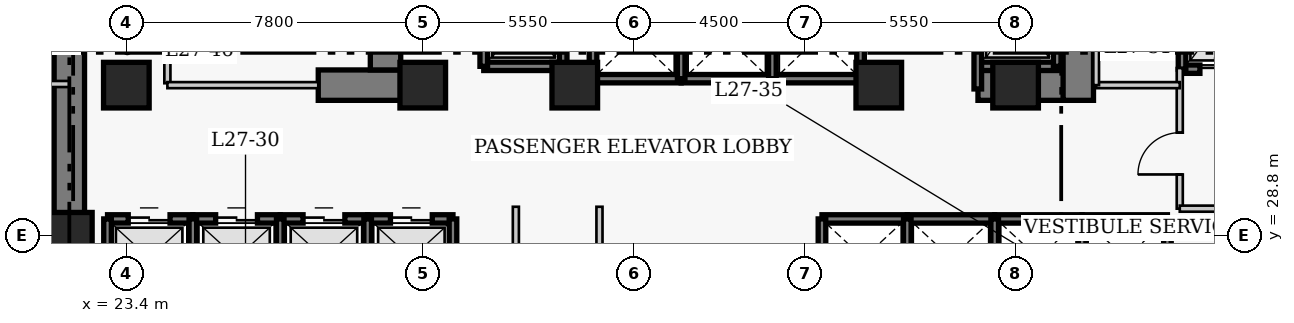
"""IFC4 building model, lengths in metres.
Left out: names, types, materials, properties, quantities, classifications, styles, units other than length and angle.
Written with IfcOpenShell. Run it as: python <this file> out.ifc"""

import sys

from ifc_helpers import new_model, si_unit, direction, frame, frame_2d, origin, origin_2d, place, context, subcontext, project, spatial, rectangle, extrude, element, fill, save


model = new_model("IFC4")
c1 = context("Model", 3, precision=1e-05, world=origin(), true_north=direction((0.0, 1.0)))
c2 = subcontext(c1, "Body", "Model", "MODEL_VIEW")
j1 = project(units=[si_unit("LENGTHUNIT", "METRE"), si_unit("PLANEANGLEUNIT", "RADIAN")], contexts=[c1])
p1 = place(None, origin())
s1 = spatial("IfcSite", under=j1, at=p1, CompositionType="ELEMENT")
p2 = place(p1, origin())
s2 = spatial("IfcBuilding", under=s1, at=p2, CompositionType="ELEMENT")
p3 = place(p2, frame((0.0, 0.0, 110.8)))
s3 = spatial("IfcBuildingStorey", under=s2, at=p3, CompositionType="ELEMENT", Elevation=110.8)
p4 = place(p3, frame((21.9, 27.05, 0.0), z_axis=(0.0, 0.0, 1.0), x_axis=(0.0, 1.0, 0.0)))
e1 = element("IfcWall", 1, at=p4, inside=s3, PredefinedType="SHEAR", context=c2, shape_type="SweptSolid", body=[
    extrude(rectangle(XDim=13.67, YDim=0.8, at=frame_2d((6.835, 0.0))), origin(), (0.0, 0.0, 1.0), 3.8),
])
p5 = place(p3, frame((28.45, 32.75, 0.0), z_axis=(0.0, 0.0, 1.0), x_axis=(1.0, 0.0, 0.0)))
e2 = element("IfcWall", 2, at=p5, inside=s3, PredefinedType="SHEAR", context=c2, shape_type="SweptSolid", body=[
    extrude(rectangle(XDim=2.4, YDim=0.8, at=frame_2d((1.2, 0.0))), origin(), (0.0, 0.0, 1.0), 3.8),
])
p6 = place(p3, frame((45.81, 32.75, 0.0), z_axis=(0.0, 0.0, 1.0), x_axis=(1.0, 0.0, 0.0)))
e3 = element("IfcWall", 3, at=p6, inside=s3, PredefinedType="SHEAR", context=c2, shape_type="SweptSolid", body=[
    extrude(rectangle(XDim=2.64, YDim=0.8, at=frame_2d((1.32, 0.0))), origin(), (0.0, 0.0, 1.0), 3.8),
])
p7 = place(p3, frame((30.22, 33.15, 0.0), z_axis=(0.0, 0.0, 1.0), x_axis=(0.0, 1.0, 0.0)))
e4 = element("IfcWall", 4, at=p7, inside=s3, PredefinedType="SHEAR", context=c2, shape_type="SweptSolid", body=[
    extrude(rectangle(XDim=7.17, YDim=0.8, at=frame_2d((3.585, 0.0))), origin(), (0.0, 0.0, 1.0), 3.8),
])
p8 = place(p3, frame((48.45, 32.35, 0.0), z_axis=(0.0, 0.0, 1.0), x_axis=(0.0, 1.0, 0.0)))
e5 = element("IfcWall", 5, at=p8, inside=s3, PredefinedType="SHEAR", context=c2, shape_type="SweptSolid", body=[
    extrude(rectangle(XDim=7.97, YDim=0.8, at=frame_2d((3.985, 0.0))), origin(), (0.0, 0.0, 1.0), 3.8),
])
p9 = place(p8, frame((5.85, 0.0, 0.0)))
e6 = element("IfcOpeningElement", 6, at=p9, cuts=e5, PredefinedType="OPENING", context=c2, shape_type="SweptSolid", body=[
    extrude(rectangle(XDim=1.1, YDim=2.15, at=frame_2d((0.55, 1.075))), frame((0.0, 0.41, 0.0), z_axis=(0.0, -1.0, 0.0), x_axis=(1.0, 0.0, 0.0)), (0.0, 0.0, 1.0), 0.82),
])
for number, where, z_axis, x_axis in (
    (7, (21.9, 28.8, 0.0), (0.0, 0.0, 1.0), (1.0, 0.0, 0.0)),
    (8, (23.4, 32.75, 0.0), (0.0, 0.0, 1.0), (1.0, 0.0, 0.0)),
    (9, (31.2, 32.75, 0.0), (0.0, 0.0, 1.0), (1.0, 0.0, 0.0)),
    (10, (35.2, 32.75, 0.0), (0.0, 0.0, 1.0), (1.0, 0.0, 0.0)),
    (11, (43.2, 32.75, 0.0), (0.0, 0.0, 1.0), (1.0, 0.0, 0.0)),
    (12, (46.8, 32.75, 0.0), (0.0, 0.0, 1.0), (1.0, 0.0, 0.0)),
):
    element("IfcColumn", number, at=place(p3, frame(where, z_axis=z_axis, x_axis=x_axis)), inside=s3, PredefinedType="COLUMN", context=c2, shape_type="SweptSolid", body=[
        extrude(rectangle(XDim=1.2, YDim=1.2, at=origin_2d()), origin(), (0.0, 0.0, 1.0), 3.8),
    ])
p10 = place(p3, frame((22.905, 29.23, 0.0), z_axis=(0.0, 0.0, 1.0), x_axis=(1.0, 0.0, 0.0)))
e13 = element("IfcWall", 13, at=p10, inside=s3, PredefinedType="SHEAR", context=c2, shape_type="SweptSolid", body=[
    extrude(rectangle(XDim=2.245, YDim=0.22, at=frame_2d((1.123, 0.0))), origin(), (0.0, 0.0, 1.0), 3.8),
])
p11 = place(p10, frame((0.545, 0.0, 0.0)))
e14 = element("IfcOpeningElement", 14, at=p11, cuts=e13, PredefinedType="OPENING", context=c2, shape_type="SweptSolid", body=[
    extrude(rectangle(XDim=1.1, YDim=2.15, at=frame_2d((0.55, 1.075))), frame((0.0, 0.12, 0.0), z_axis=(0.0, -1.0, 0.0), x_axis=(1.0, 0.0, 0.0)), (0.0, 0.0, 1.0), 0.24),
])
p12 = place(p3, frame((22.905, 27.17, 0.0), z_axis=(0.0, 0.0, 1.0), x_axis=(0.0, 1.0, 0.0)))
e15 = element("IfcWall", 15, at=p12, inside=s3, PredefinedType="SHEAR", context=c2, shape_type="SweptSolid", body=[
    extrude(rectangle(XDim=2.06, YDim=0.2, at=frame_2d((1.03, 0.0))), origin(), (0.0, 0.0, 1.0), 3.8),
])
p13 = place(p3, frame((25.15, 29.23, 0.0), z_axis=(0.0, 0.0, 1.0), x_axis=(1.0, 0.0, 0.0)))
e16 = element("IfcWall", 16, at=p13, inside=s3, PredefinedType="SHEAR", context=c2, shape_type="SweptSolid", body=[
    extrude(rectangle(XDim=2.3, YDim=0.22, at=frame_2d((1.15, 0.0))), origin(), (0.0, 0.0, 1.0), 3.8),
])
p14 = place(p13, frame((0.6, 0.0, 0.0)))
e17 = element("IfcOpeningElement", 17, at=p14, cuts=e16, PredefinedType="OPENING", context=c2, shape_type="SweptSolid", body=[
    extrude(rectangle(XDim=1.1, YDim=2.15, at=frame_2d((0.55, 1.075))), frame((0.0, 0.12, 0.0), z_axis=(0.0, -1.0, 0.0), x_axis=(1.0, 0.0, 0.0)), (0.0, 0.0, 1.0), 0.24),
])
p15 = place(p3, frame((25.15, 27.17, 0.0), z_axis=(0.0, 0.0, 1.0), x_axis=(0.0, 1.0, 0.0)))
e18 = element("IfcWall", 18, at=p15, inside=s3, PredefinedType="SHEAR", context=c2, shape_type="SweptSolid", body=[
    extrude(rectangle(XDim=2.06, YDim=0.2, at=frame_2d((1.03, 0.0))), origin(), (0.0, 0.0, 1.0), 3.8),
])
p16 = place(p3, frame((27.45, 29.23, 0.0), z_axis=(0.0, 0.0, 1.0), x_axis=(1.0, 0.0, 0.0)))
e19 = element("IfcWall", 19, at=p16, inside=s3, PredefinedType="SHEAR", context=c2, shape_type="SweptSolid", body=[
    extrude(rectangle(XDim=2.3, YDim=0.22, at=frame_2d((1.15, 0.0))), origin(), (0.0, 0.0, 1.0), 3.8),
])
p17 = place(p16, frame((0.6, 0.0, 0.0)))
e20 = element("IfcOpeningElement", 20, at=p17, cuts=e19, PredefinedType="OPENING", context=c2, shape_type="SweptSolid", body=[
    extrude(rectangle(XDim=1.1, YDim=2.15, at=frame_2d((0.55, 1.075))), frame((0.0, 0.12, 0.0), z_axis=(0.0, -1.0, 0.0), x_axis=(1.0, 0.0, 0.0)), (0.0, 0.0, 1.0), 0.24),
])
p18 = place(p3, frame((27.45, 27.17, 0.0), z_axis=(0.0, 0.0, 1.0), x_axis=(0.0, 1.0, 0.0)))
e21 = element("IfcWall", 21, at=p18, inside=s3, PredefinedType="SHEAR", context=c2, shape_type="SweptSolid", body=[
    extrude(rectangle(XDim=2.06, YDim=0.2, at=frame_2d((1.03, 0.0))), origin(), (0.0, 0.0, 1.0), 3.8),
])
p19 = place(p3, frame((29.75, 29.23, 0.0), z_axis=(0.0, 0.0, 1.0), x_axis=(1.0, 0.0, 0.0)))
e22 = element("IfcWall", 22, at=p19, inside=s3, PredefinedType="SHEAR", context=c2, shape_type="SweptSolid", body=[
    extrude(rectangle(XDim=2.245, YDim=0.22, at=frame_2d((1.123, 0.0))), origin(), (0.0, 0.0, 1.0), 3.8),
])
p20 = place(p19, frame((0.6, 0.0, 0.0)))
e23 = element("IfcOpeningElement", 23, at=p20, cuts=e22, PredefinedType="OPENING", context=c2, shape_type="SweptSolid", body=[
    extrude(rectangle(XDim=1.1, YDim=2.15, at=frame_2d((0.55, 1.075))), frame((0.0, 0.12, 0.0), z_axis=(0.0, -1.0, 0.0), x_axis=(1.0, 0.0, 0.0)), (0.0, 0.0, 1.0), 0.24),
])
for number, where, z_axis, x_axis in (
    (24, (29.75, 27.17, 0.0), (0.0, 0.0, 1.0), (0.0, 1.0, 0.0)),
    (25, (31.995, 27.17, 0.0), (0.0, 0.0, 1.0), (0.0, 1.0, 0.0)),
):
    element("IfcWall", number, at=place(p3, frame(where, z_axis=z_axis, x_axis=x_axis)), inside=s3, PredefinedType="SHEAR", context=c2, shape_type="SweptSolid", body=[
        extrude(rectangle(XDim=2.06, YDim=0.2, at=frame_2d((1.03, 0.0))), origin(), (0.0, 0.0, 1.0), 3.8),
    ])
p21 = place(p3, frame((41.705, 29.23, 0.0), z_axis=(0.0, 0.0, 1.0), x_axis=(1.0, 0.0, 0.0)))
e26 = element("IfcWall", 26, at=p21, inside=s3, PredefinedType="SHEAR", context=c2, shape_type="SweptSolid", body=[
    extrude(rectangle(XDim=2.245, YDim=0.22, at=frame_2d((1.123, 0.0))), origin(), (0.0, 0.0, 1.0), 3.8),
])
p22 = place(p3, frame((41.705, 27.17, 0.0), z_axis=(0.0, 0.0, 1.0), x_axis=(0.0, 1.0, 0.0)))
e27 = element("IfcWall", 27, at=p22, inside=s3, PredefinedType="SHEAR", context=c2, shape_type="SweptSolid", body=[
    extrude(rectangle(XDim=2.06, YDim=0.2, at=frame_2d((1.03, 0.0))), origin(), (0.0, 0.0, 1.0), 3.8),
])
p23 = place(p3, frame((43.95, 29.23, 0.0), z_axis=(0.0, 0.0, 1.0), x_axis=(1.0, 0.0, 0.0)))
e28 = element("IfcWall", 28, at=p23, inside=s3, PredefinedType="SHEAR", context=c2, shape_type="SweptSolid", body=[
    extrude(rectangle(XDim=2.3, YDim=0.22, at=frame_2d((1.15, 0.0))), origin(), (0.0, 0.0, 1.0), 3.8),
])
p24 = place(p3, frame((43.95, 27.17, 0.0), z_axis=(0.0, 0.0, 1.0), x_axis=(0.0, 1.0, 0.0)))
e29 = element("IfcWall", 29, at=p24, inside=s3, PredefinedType="SHEAR", context=c2, shape_type="SweptSolid", body=[
    extrude(rectangle(XDim=2.06, YDim=0.2, at=frame_2d((1.03, 0.0))), origin(), (0.0, 0.0, 1.0), 3.8),
])
p25 = place(p3, frame((46.25, 29.23, 0.0), z_axis=(0.0, 0.0, 1.0), x_axis=(1.0, 0.0, 0.0)))
e30 = element("IfcWall", 30, at=p25, inside=s3, PredefinedType="SHEAR", context=c2, shape_type="SweptSolid", body=[
    extrude(rectangle(XDim=2.3, YDim=0.22, at=frame_2d((1.15, 0.0))), origin(), (0.0, 0.0, 1.0), 3.8),
])
p26 = place(p3, frame((46.25, 27.17, 0.0), z_axis=(0.0, 0.0, 1.0), x_axis=(0.0, 1.0, 0.0)))
e31 = element("IfcWall", 31, at=p26, inside=s3, PredefinedType="SHEAR", context=c2, shape_type="SweptSolid", body=[
    extrude(rectangle(XDim=2.06, YDim=0.2, at=frame_2d((1.03, 0.0))), origin(), (0.0, 0.0, 1.0), 3.8),
])
p27 = place(p3, frame((48.55, 29.23, 0.0), z_axis=(0.0, 0.0, 1.0), x_axis=(1.0, 0.0, 0.0)))
e32 = element("IfcWall", 32, at=p27, inside=s3, PredefinedType="SHEAR", context=c2, shape_type="SweptSolid", body=[
    extrude(rectangle(XDim=2.245, YDim=0.22, at=frame_2d((1.123, 0.0))), origin(), (0.0, 0.0, 1.0), 3.8),
])
for number, where, z_axis, x_axis in (
    (33, (48.55, 27.17, 0.0), (0.0, 0.0, 1.0), (0.0, 1.0, 0.0)),
    (34, (50.795, 27.17, 0.0), (0.0, 0.0, 1.0), (0.0, 1.0, 0.0)),
):
    element("IfcWall", number, at=place(p3, frame(where, z_axis=z_axis, x_axis=x_axis)), inside=s3, PredefinedType="SHEAR", context=c2, shape_type="SweptSolid", body=[
        extrude(rectangle(XDim=2.06, YDim=0.2, at=frame_2d((1.03, 0.0))), origin(), (0.0, 0.0, 1.0), 3.8),
    ])
p28 = place(p3, frame((35.68, 32.92, 0.0), z_axis=(0.0, 0.0, 1.0), x_axis=(1.0, 0.0, 0.0)))
e35 = element("IfcWall", 35, at=p28, inside=s3, PredefinedType="SHEAR", context=c2, shape_type="SweptSolid", body=[
    extrude(rectangle(XDim=2.32, YDim=0.22, at=frame_2d((1.16, 0.0))), origin(), (0.0, 0.0, 1.0), 3.8),
])
p29 = place(p3, frame((35.68, 32.92, 0.0), z_axis=(0.0, 0.0, 1.0), x_axis=(0.0, 1.0, 0.0)))
e36 = element("IfcWall", 36, at=p29, inside=s3, PredefinedType="SHEAR", context=c2, shape_type="SweptSolid", body=[
    extrude(rectangle(XDim=2.16, YDim=0.2, at=frame_2d((1.08, 0.0))), origin(), (0.0, 0.0, 1.0), 3.8),
])
p30 = place(p3, frame((38.0, 32.92, 0.0), z_axis=(0.0, 0.0, 1.0), x_axis=(1.0, 0.0, 0.0)))
e37 = element("IfcWall", 37, at=p30, inside=s3, PredefinedType="SHEAR", context=c2, shape_type="SweptSolid", body=[
    extrude(rectangle(XDim=2.4, YDim=0.22, at=frame_2d((1.2, 0.0))), origin(), (0.0, 0.0, 1.0), 3.8),
])
p31 = place(p3, frame((38.0, 32.92, 0.0), z_axis=(0.0, 0.0, 1.0), x_axis=(0.0, 1.0, 0.0)))
e38 = element("IfcWall", 38, at=p31, inside=s3, PredefinedType="SHEAR", context=c2, shape_type="SweptSolid", body=[
    extrude(rectangle(XDim=2.16, YDim=0.2, at=frame_2d((1.08, 0.0))), origin(), (0.0, 0.0, 1.0), 3.8),
])
p32 = place(p3, frame((40.4, 32.92, 0.0), z_axis=(0.0, 0.0, 1.0), x_axis=(1.0, 0.0, 0.0)))
e39 = element("IfcWall", 39, at=p32, inside=s3, PredefinedType="SHEAR", context=c2, shape_type="SweptSolid", body=[
    extrude(rectangle(XDim=2.32, YDim=0.22, at=frame_2d((1.16, 0.0))), origin(), (0.0, 0.0, 1.0), 3.8),
])
for number, where, z_axis, x_axis in (
    (40, (40.4, 32.92, 0.0), (0.0, 0.0, 1.0), (0.0, 1.0, 0.0)),
    (41, (42.72, 32.92, 0.0), (0.0, 0.0, 1.0), (0.0, 1.0, 0.0)),
):
    element("IfcWall", number, at=place(p3, frame(where, z_axis=z_axis, x_axis=x_axis)), inside=s3, PredefinedType="SHEAR", context=c2, shape_type="SweptSolid", body=[
        extrude(rectangle(XDim=2.16, YDim=0.2, at=frame_2d((1.08, 0.0))), origin(), (0.0, 0.0, 1.0), 3.8),
    ])
p33 = place(p3, frame((51.18, 33.17, 0.0), z_axis=(0.0, 0.0, 1.0), x_axis=(1.0, 0.0, 0.0)))
e42 = element("IfcWall", 42, at=p33, inside=s3, PredefinedType="SHEAR", context=c2, shape_type="SweptSolid", body=[
    extrude(rectangle(XDim=2.42, YDim=0.22, at=frame_2d((1.21, 0.0))), origin(), (0.0, 0.0, 1.0), 3.8),
])
p34 = place(p33, frame((0.47, 0.0, 0.0)))
e43 = element("IfcOpeningElement", 43, at=p34, cuts=e42, PredefinedType="OPENING", context=c2, shape_type="SweptSolid", body=[
    extrude(rectangle(XDim=1.3, YDim=2.15, at=frame_2d((0.65, 1.075))), frame((0.0, 0.12, 0.0), z_axis=(0.0, -1.0, 0.0), x_axis=(1.0, 0.0, 0.0)), (0.0, 0.0, 1.0), 0.24),
])
p35 = place(p3, frame((51.18, 33.17, 0.0), z_axis=(0.0, 0.0, 1.0), x_axis=(0.0, 1.0, 0.0)))
e44 = element("IfcWall", 44, at=p35, inside=s3, PredefinedType="SHEAR", context=c2, shape_type="SweptSolid", body=[
    extrude(rectangle(XDim=2.86, YDim=0.2, at=frame_2d((1.43, 0.0))), origin(), (0.0, 0.0, 1.0), 3.8),
])
p36 = place(p3, frame((32.805, 33.245, 0.0), z_axis=(0.0, 0.0, 1.0), x_axis=(1.0, 0.0, 0.0)))
e45 = element("IfcWall", 45, at=p36, inside=s3, PredefinedType="SHEAR", context=c2, shape_type="SweptSolid", body=[
    extrude(rectangle(XDim=2.09, YDim=0.22, at=frame_2d((1.045, 0.0))), origin(), (0.0, 0.0, 1.0), 3.8),
])
for number, where, z_axis, x_axis in (
    (46, (32.805, 33.245, 0.0), (0.0, 0.0, 1.0), (0.0, 1.0, 0.0)),
    (47, (34.895, 33.245, 0.0), (0.0, 0.0, 1.0), (0.0, 1.0, 0.0)),
):
    element("IfcWall", number, at=place(p3, frame(where, z_axis=z_axis, x_axis=x_axis)), inside=s3, PredefinedType="SHEAR", context=c2, shape_type="SweptSolid", body=[
        extrude(rectangle(XDim=2.91, YDim=0.2, at=frame_2d((1.455, 0.0))), origin(), (0.0, 0.0, 1.0), 3.8),
    ])
p37 = place(p3, frame((45.805, 33.245, 0.0), z_axis=(0.0, 0.0, 1.0), x_axis=(1.0, 0.0, 0.0)))
e48 = element("IfcWall", 48, at=p37, inside=s3, PredefinedType="SHEAR", context=c2, shape_type="SweptSolid", body=[
    extrude(rectangle(XDim=2.09, YDim=0.22, at=frame_2d((1.045, 0.0))), origin(), (0.0, 0.0, 1.0), 3.8),
])
p38 = place(p3, frame((45.805, 32.65, 0.0), z_axis=(0.0, 0.0, 1.0), x_axis=(0.0, 1.0, 0.0)))
e49 = element("IfcWall", 49, at=p38, inside=s3, PredefinedType="SHEAR", context=c2, shape_type="SweptSolid", body=[
    extrude(rectangle(XDim=3.505, YDim=0.2, at=frame_2d((1.752, 0.0))), origin(), (0.0, 0.0, 1.0), 3.8),
])
p39 = place(p3, frame((47.895, 33.245, 0.0), z_axis=(0.0, 0.0, 1.0), x_axis=(0.0, 1.0, 0.0)))
e50 = element("IfcWall", 50, at=p39, inside=s3, PredefinedType="SHEAR", context=c2, shape_type="SweptSolid", body=[
    extrude(rectangle(XDim=2.91, YDim=0.2, at=frame_2d((1.455, 0.0))), origin(), (0.0, 0.0, 1.0), 3.8),
])
p40 = place(p3, frame((24.48, 32.8, 0.0), z_axis=(0.0, 0.0, 1.0), x_axis=(0.0, 1.0, 0.0)))
e51 = element("IfcWall", 51, at=p40, inside=s3, PredefinedType="PARTITIONING", context=c2, shape_type="SweptSolid", body=[
    extrude(rectangle(XDim=3.57, YDim=0.16, at=frame_2d((1.785, 0.0))), origin(), (0.0, 0.0, 1.0), 3.54),
])
p41 = place(p40, frame((1.604, 0.0, 0.0)))
e52 = element("IfcOpeningElement", 52, at=p41, cuts=e51, PredefinedType="OPENING", context=c2, shape_type="SweptSolid", body=[
    extrude(rectangle(XDim=0.9, YDim=2.1, at=frame_2d((0.45, 1.05))), frame((0.0, 0.09, 0.0), z_axis=(0.0, -1.0, 0.0), x_axis=(1.0, 0.0, 0.0)), (0.0, 0.0, 1.0), 0.18),
])
p42 = place(p3, frame((51.12, 29.5, 0.0), z_axis=(0.0, 0.0, 1.0), x_axis=(0.0, 1.0, 0.0)))
e53 = element("IfcWall", 53, at=p42, inside=s3, PredefinedType="PARTITIONING", context=c2, shape_type="SweptSolid", body=[
    extrude(rectangle(XDim=3.7, YDim=0.16, at=frame_2d((1.85, 0.0))), origin(), (0.0, 0.0, 1.0), 3.54),
])
p43 = place(p42, frame((0.9, 0.0, 0.0)))
e54 = element("IfcOpeningElement", 54, at=p43, cuts=e53, PredefinedType="OPENING", context=c2, shape_type="SweptSolid", body=[
    extrude(rectangle(XDim=1.1, YDim=2.15, at=frame_2d((0.55, 1.075))), frame((0.0, 0.09, 0.0), z_axis=(0.0, -1.0, 0.0), x_axis=(1.0, 0.0, 0.0)), (0.0, 0.0, 1.0), 0.18),
])
p44 = place(p3, frame((51.12, 29.5, 0.0), z_axis=(0.0, 0.0, 1.0), x_axis=(1.0, 0.0, 0.0)))
e55 = element("IfcWall", 55, at=p44, inside=s3, PredefinedType="PARTITIONING", context=c2, shape_type="SweptSolid", body=[
    extrude(rectangle(XDim=5.63, YDim=0.16, at=frame_2d((2.815, 0.0))), origin(), (0.0, 0.0, 1.0), 3.54),
])
p45 = place(p3, frame((24.48, 32.75, 0.0), z_axis=(0.0, 0.0, 1.0), x_axis=(1.0, 0.0, 0.0)))
e56 = element("IfcWall", 56, at=p45, inside=s3, PredefinedType="PARTITIONING", context=c2, shape_type="SweptSolid", body=[
    extrude(rectangle(XDim=3.97, YDim=0.16, at=frame_2d((1.985, 0.0))), origin(), (0.0, 0.0, 1.0), 3.54),
])
p46 = place(p3, frame((48.92, 32.75, 0.0), z_axis=(0.0, 0.0, 1.0), x_axis=(1.0, 0.0, 0.0)))
e57 = element("IfcWall", 57, at=p46, inside=s3, PredefinedType="PARTITIONING", context=c2, shape_type="SweptSolid", body=[
    extrude(rectangle(XDim=2.2, YDim=0.16, at=frame_2d((1.1, 0.0))), origin(), (0.0, 0.0, 1.0), 3.54),
])
p47 = place(p3, frame((48.92, 32.75, 0.0), z_axis=(0.0, 0.0, 1.0), x_axis=(0.0, 1.0, 0.0)))
e58 = element("IfcWall", 58, at=p47, inside=s3, PredefinedType="PARTITIONING", context=c2, shape_type="SweptSolid", body=[
    extrude(rectangle(XDim=3.62, YDim=0.15, at=frame_2d((1.81, 0.0))), origin(), (0.0, 0.0, 1.0), 3.54),
])
for number, where, z_axis, x_axis in (
    (59, (33.65, 26.36, 0.0), (0.0, 0.0, 1.0), (0.0, 1.0, 0.0)),
    (60, (35.85, 26.36, 0.0), (0.0, 0.0, 1.0), (0.0, 1.0, 0.0)),
):
    element("IfcWall", number, at=place(p3, frame(where, z_axis=z_axis, x_axis=x_axis)), inside=s3, PredefinedType="PARTITIONING", context=c2, shape_type="SweptSolid", body=[
        extrude(rectangle(XDim=3.19, YDim=0.16, at=frame_2d((1.595, 0.0))), origin(), (0.0, 0.0, 1.0), 3.54),
    ])
p48 = place(p3, frame((19.96, 32.78, 0.0), z_axis=(0.0, 0.0, 1.0), x_axis=(1.0, 0.0, 0.0)))
e61 = element("IfcWall", 61, at=p48, inside=s3, PredefinedType="PARTITIONING", context=c2, shape_type="SweptSolid", body=[
    extrude(rectangle(XDim=1.94, YDim=0.16, at=frame_2d((0.97, 0.0))), origin(), (0.0, 0.0, 1.0), 3.54),
])
p49 = place(p11, origin())
e62 = element("IfcDoor", 62, at=p49, inside=s3, OperationType="DOUBLE_DOOR_SLIDING", PredefinedType="DOOR", context=c2, shape_type="SweptSolid", body=[
    extrude(rectangle(XDim=1.1, YDim=2.15, at=frame_2d((0.55, 1.075))), frame((0.0, 0.025, 0.0), z_axis=(0.0, -1.0, 0.0), x_axis=(1.0, 0.0, 0.0)), (0.0, 0.0, 1.0), 0.05),
])
fill(e14, e62)
p50 = place(p14, origin())
e63 = element("IfcDoor", 63, at=p50, inside=s3, OperationType="DOUBLE_DOOR_SLIDING", PredefinedType="DOOR", context=c2, shape_type="SweptSolid", body=[
    extrude(rectangle(XDim=1.1, YDim=2.15, at=frame_2d((0.55, 1.075))), frame((0.0, 0.025, 0.0), z_axis=(0.0, -1.0, 0.0), x_axis=(1.0, 0.0, 0.0)), (0.0, 0.0, 1.0), 0.05),
])
fill(e17, e63)
p51 = place(p17, origin())
e64 = element("IfcDoor", 64, at=p51, inside=s3, OperationType="DOUBLE_DOOR_SLIDING", PredefinedType="DOOR", context=c2, shape_type="SweptSolid", body=[
    extrude(rectangle(XDim=1.1, YDim=2.15, at=frame_2d((0.55, 1.075))), frame((0.0, 0.025, 0.0), z_axis=(0.0, -1.0, 0.0), x_axis=(1.0, 0.0, 0.0)), (0.0, 0.0, 1.0), 0.05),
])
fill(e20, e64)
p52 = place(p20, origin())
e65 = element("IfcDoor", 65, at=p52, inside=s3, OperationType="DOUBLE_DOOR_SLIDING", PredefinedType="DOOR", context=c2, shape_type="SweptSolid", body=[
    extrude(rectangle(XDim=1.1, YDim=2.15, at=frame_2d((0.55, 1.075))), frame((0.0, 0.025, 0.0), z_axis=(0.0, -1.0, 0.0), x_axis=(1.0, 0.0, 0.0)), (0.0, 0.0, 1.0), 0.05),
])
fill(e23, e65)
p53 = place(p34, origin())
e66 = element("IfcDoor", 66, at=p53, inside=s3, OperationType="DOUBLE_DOOR_SLIDING", PredefinedType="DOOR", context=c2, shape_type="SweptSolid", body=[
    extrude(rectangle(XDim=1.3, YDim=2.15, at=frame_2d((0.65, 1.075))), frame((0.0, 0.025, 0.0), z_axis=(0.0, -1.0, 0.0), x_axis=(1.0, 0.0, 0.0)), (0.0, 0.0, 1.0), 0.05),
])
fill(e43, e66)
p54 = place(p43, origin())
e67 = element("IfcDoor", 67, at=p54, inside=s3, OperationType="SINGLE_SWING_LEFT", PredefinedType="DOOR", context=c2, shape_type="SweptSolid", body=[
    extrude(rectangle(XDim=1.1, YDim=2.15, at=frame_2d((0.55, 1.075))), frame((0.0, 0.025, 0.0), z_axis=(0.0, -1.0, 0.0), x_axis=(1.0, 0.0, 0.0)), (0.0, 0.0, 1.0), 0.05),
])
fill(e54, e67)
save(model, sys.argv[1])
